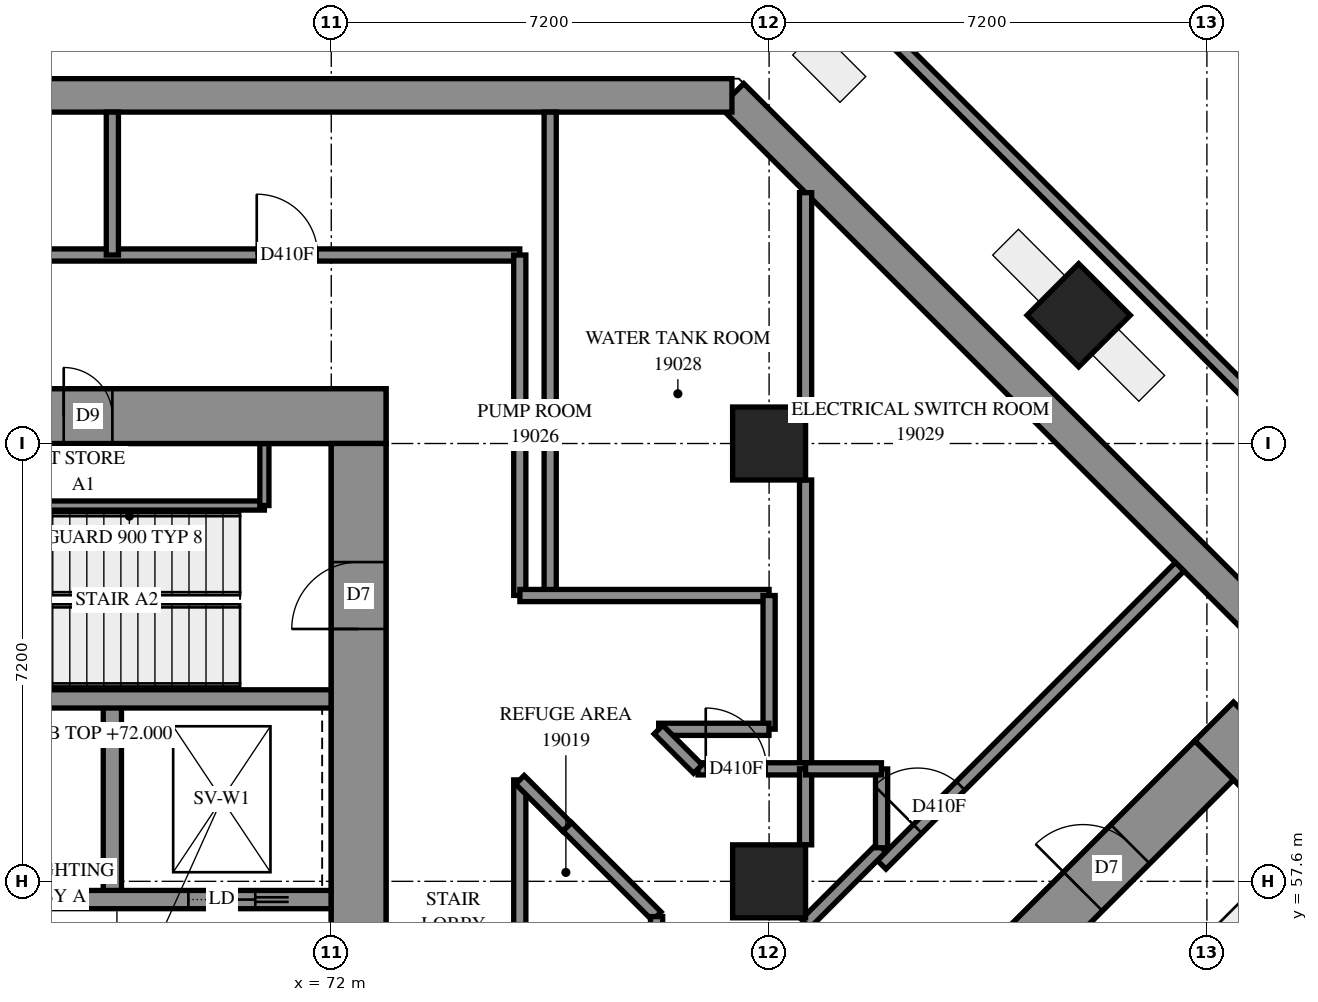
"""IFC4 building model, lengths in metres.
Left out: names, types, materials, properties, quantities, classifications, styles, units other than length and angle.
Written with IfcOpenShell. Run it as: python <this file> out.ifc"""

import sys

from ifc_helpers import new_model, si_unit, direction, frame, frame_2d, origin, origin_2d, place, context, subcontext, project, spatial, polyline, rectangle, outline, extrude, element, fill, save


model = new_model("IFC4")
c1 = context("Model", 3, precision=1e-05, world=origin(), true_north=direction((0.0, 1.0)))
c2 = subcontext(c1, "Body", "Model", "MODEL_VIEW")
j1 = project(units=[si_unit("LENGTHUNIT", "METRE"), si_unit("PLANEANGLEUNIT", "RADIAN")], contexts=[c1])
p1 = place(None, origin())
s1 = spatial("IfcSite", under=j1, at=p1, CompositionType="ELEMENT")
p2 = place(p1, origin())
s2 = spatial("IfcBuilding", under=s1, at=p2, CompositionType="ELEMENT")
p3 = place(p2, frame((0.0, 0.0, 72.0)))
s3 = spatial("IfcBuildingStorey", under=s2, at=p3, CompositionType="ELEMENT", Elevation=72.0)
for number, where, z_axis, x_axis in (
    (1, (79.2, 57.6, 0.0), (0.0, 0.0, 1.0), (1.0, 0.0, 0.0)),
    (2, (79.2, 64.8, 0.0), (0.0, 0.0, 1.0), (1.0, 0.0, 0.0)),
):
    element("IfcColumn", number, at=place(p3, frame(where, z_axis=z_axis, x_axis=x_axis)), inside=s3, PredefinedType="COLUMN", context=c2, shape_type="SweptSolid", body=[
        extrude(rectangle(XDim=1.2, YDim=1.2, at=origin_2d()), origin(), (0.0, 0.0, 1.0), 4.7),
    ])
p4 = place(p3, frame((84.291, 66.909, -0.3), z_axis=(0.0, 0.0, 1.0), x_axis=(0.7071067812, -0.7071067812, 0.0)))
e3 = element("IfcColumn", 3, at=p4, inside=s3, PredefinedType="COLUMN", context=c2, shape_type="SweptSolid", body=[
    extrude(rectangle(XDim=1.2, YDim=1.2, at=origin_2d()), origin(), (0.0, 0.0, 1.0), 5.0),
])
p5 = place(p3, frame((56.7, 65.25, -0.3), z_axis=(0.0, 0.0, 1.0), x_axis=(1.0, 0.0, 0.0)))
e4 = element("IfcWall", 4, at=p5, inside=s3, PredefinedType="SHEAR", context=c2, shape_type="SweptSolid", body=[
    extrude(rectangle(XDim=16.2, YDim=0.9, at=frame_2d((8.1, 0.0))), origin(), (0.0, 0.0, 1.0), 4.3),
])
p6 = place(p5, frame((10.9, 0.0, 0.3)))
e5 = element("IfcOpeningElement", 5, at=p6, cuts=e4, PredefinedType="OPENING", context=c2, shape_type="SweptSolid", body=[
    extrude(rectangle(XDim=0.8, YDim=2.1, at=frame_2d((0.4, 1.05))), frame((0.0, 0.46, 0.0), z_axis=(0.0, -1.0, 0.0), x_axis=(1.0, 0.0, 0.0)), (0.0, 0.0, 1.0), 0.92),
])
p7 = place(p3, frame((72.45, 50.4, -0.3), z_axis=(0.0, 0.0, 1.0), x_axis=(0.0, 1.0, 0.0)))
e6 = element("IfcWall", 6, at=p7, inside=s3, PredefinedType="SHEAR", context=c2, shape_type="SweptSolid", body=[
    extrude(rectangle(XDim=14.4, YDim=0.9, at=frame_2d((7.2, 0.0))), origin(), (0.0, 0.0, 1.0), 4.3),
])
p8 = place(p7, frame((4.55, 0.0, 0.3)))
e7 = element("IfcOpeningElement", 7, at=p8, cuts=e6, PredefinedType="OPENING", context=c2, shape_type="SweptSolid", body=[
    extrude(rectangle(XDim=1.1, YDim=2.1, at=frame_2d((0.55, 1.05))), frame((0.0, 0.46, 0.0), z_axis=(0.0, -1.0, 0.0), x_axis=(1.0, 0.0, 0.0)), (0.0, 0.0, 1.0), 0.92),
])
p9 = place(p7, frame((11.35, 0.0, 0.3)))
e8 = element("IfcOpeningElement", 8, at=p9, cuts=e6, PredefinedType="OPENING", context=c2, shape_type="SweptSolid", body=[
    extrude(rectangle(XDim=1.1, YDim=2.1, at=frame_2d((0.55, 1.05))), frame((0.0, 0.46, 0.0), z_axis=(0.0, -1.0, 0.0), x_axis=(1.0, 0.0, 0.0)), (0.0, 0.0, 1.0), 0.92),
])
p10 = place(p3, frame((68.4, 57.3, 0.0), z_axis=(0.0, 0.0, 1.0), x_axis=(0.0, 1.0, 0.0)))
e9 = element("IfcWall", 9, at=p10, inside=s3, PredefinedType="SOLIDWALL", context=c2, shape_type="SweptSolid", body=[
    extrude(rectangle(XDim=3.3, YDim=0.3, at=frame_2d((1.65, 0.0))), origin(), (0.0, 0.0, 1.0), 4.7),
])
p11 = place(p3, frame((57.6, 57.3, 0.0), z_axis=(0.0, 0.0, 1.0), x_axis=(1.0, 0.0, 0.0)))
e10 = element("IfcWall", 10, at=p11, inside=s3, PredefinedType="SOLIDWALL", context=c2, shape_type="SweptSolid", body=[
    extrude(rectangle(XDim=14.4, YDim=0.3, at=frame_2d((7.2, 0.0))), origin(), (0.0, 0.0, 1.0), 4.7),
])
p12 = place(p11, frame((12.05, 0.0, 0.0)))
e11 = element("IfcOpeningElement", 11, at=p12, cuts=e10, PredefinedType="OPENING", context=c2, shape_type="SweptSolid", body=[
    extrude(rectangle(XDim=1.1, YDim=2.1, at=frame_2d((0.55, 1.05))), frame((0.0, 0.16, 0.0), z_axis=(0.0, -1.0, 0.0), x_axis=(1.0, 0.0, 0.0)), (0.0, 0.0, 1.0), 0.32),
])
p13 = place(p3, frame((64.8, 60.6, 0.0), z_axis=(0.0, 0.0, 1.0), x_axis=(1.0, 0.0, 0.0)))
e12 = element("IfcWall", 12, at=p13, inside=s3, PredefinedType="SOLIDWALL", context=c2, shape_type="SweptSolid", body=[
    extrude(rectangle(XDim=7.2, YDim=0.3, at=frame_2d((3.6, 0.0))), origin(), (0.0, 0.0, 1.0), 4.7),
])
p14 = place(p3, frame((86.519, 60.227, -0.3), z_axis=(0.0, 0.0, 1.0), x_axis=(0.7071036948, -0.7071098676, 0.0)))
e13 = element("IfcWall", 13, at=p14, inside=s3, PredefinedType="SHEAR", context=c2, shape_type="SweptSolid", body=[
    extrude(rectangle(XDim=16.2, YDim=0.9, at=frame_2d((8.1, 0.0))), origin(), (0.0, 0.0, 1.0), 4.3),
])
p15 = place(p14, frame((10.9, 0.0, 0.3)))
e14 = element("IfcOpeningElement", 14, at=p15, cuts=e13, PredefinedType="OPENING", context=c2, shape_type="SweptSolid", body=[
    extrude(rectangle(XDim=0.8, YDim=2.1, at=frame_2d((0.4, 1.05))), frame((0.0, 0.46, 0.0), z_axis=(0.0, -1.0, 0.0), x_axis=(1.0, 0.0, 0.0)), (0.0, 0.0, 1.0), 0.92),
])
p16 = place(p3, frame((76.336, 49.408, -0.3), z_axis=(0.0, 0.0, 1.0), x_axis=(0.7071067812, 0.7071067812, 0.0)))
e15 = element("IfcWall", 15, at=p16, inside=s3, PredefinedType="SHEAR", context=c2, shape_type="SweptSolid", body=[
    extrude(rectangle(XDim=14.4, YDim=0.9, at=frame_2d((7.2, 0.0))), origin(), (0.0, 0.0, 1.0), 4.3),
])
p17 = place(p16, frame((4.55, 0.0, 0.3)))
e16 = element("IfcOpeningElement", 16, at=p17, cuts=e15, PredefinedType="OPENING", context=c2, shape_type="SweptSolid", body=[
    extrude(rectangle(XDim=1.1, YDim=2.1, at=frame_2d((0.55, 1.05))), frame((0.0, 0.46, 0.0), z_axis=(0.0, -1.0, 0.0), x_axis=(1.0, 0.0, 0.0)), (0.0, 0.0, 1.0), 0.92),
])
p18 = place(p16, frame((11.35, 0.0, 0.3)))
e17 = element("IfcOpeningElement", 17, at=p18, cuts=e15, PredefinedType="OPENING", context=c2, shape_type="SweptSolid", body=[
    extrude(rectangle(XDim=1.1, YDim=2.1, at=frame_2d((0.55, 1.05))), frame((0.0, 0.46, 0.0), z_axis=(0.0, -1.0, 0.0), x_axis=(1.0, 0.0, 0.0)), (0.0, 0.0, 1.0), 0.92),
])
p19 = place(p3, frame((111.055, 38.059, 0.0), z_axis=(0.0, 0.0, 1.0), x_axis=(-0.7071078702, 0.7071056922, 0.0)))
e18 = element("IfcWall", 18, at=p19, inside=s3, PredefinedType="SOLIDWALL", context=c2, shape_type="SweptSolid", body=[
    extrude(outline(polyline([(-0.275, -0.275), (46.028, -0.275), (45.8, 0.275), (0.275, 0.275), (-0.275, -0.275)])), origin(), (0.0, 0.0, 1.0), 4.7),
])
p20 = place(p3, frame((78.589, 70.525, 0.0), z_axis=(0.0, 0.0, 1.0), x_axis=(-1.0, 0.0, 0.0)))
e19 = element("IfcWall", 19, at=p20, inside=s3, PredefinedType="SOLIDWALL", context=c2, shape_type="SweptSolid", body=[
    extrude(outline(polyline([(-0.114, -0.275), (55.789, -0.275), (55.239, 0.275), (0.114, 0.275), (-0.114, -0.275)])), origin(), (0.0, 0.0, 1.0), 4.7),
])
p21 = place(p3, frame((112.929, 39.756, 0.0), z_axis=(0.0, 0.0, 1.0), x_axis=(-0.7071067812, 0.7071067812, 0.0)))
e20 = element("IfcWall", 20, at=p21, inside=s3, PredefinedType="SOLIDWALL", context=c2, shape_type="SweptSolid", body=[
    extrude(outline(polyline([(-0.1, -0.1), (47.126, -0.1), (47.044, 0.1), (0.1, 0.1), (-0.1, -0.1)])), origin(), (0.0, 0.0, 1.0), 4.7),
])
p22 = place(p3, frame((64.95, 63.78, 0.0), z_axis=(0.0, 0.0, 1.0), x_axis=(1.0, 0.0, 0.0)))
e21 = element("IfcWall", 21, at=p22, inside=s3, PredefinedType="PARTITIONING", context=c2, shape_type="SweptSolid", body=[
    extrude(rectangle(XDim=5.95, YDim=0.15, at=frame_2d((2.975, 0.0))), origin(), (0.0, 0.0, 1.0), 4.7),
])
p23 = place(p3, frame((70.9, 63.78, 0.0), z_axis=(0.0, 0.0, 1.0), x_axis=(0.0, 1.0, 0.0)))
e22 = element("IfcWall", 22, at=p23, inside=s3, PredefinedType="PARTITIONING", context=c2, shape_type="SweptSolid", body=[
    extrude(rectangle(XDim=1.02, YDim=0.15, at=frame_2d((0.51, 0.0))), origin(), (0.0, 0.0, 1.0), 4.7),
])
p24 = place(p3, frame((54.502, 67.9, 0.0), z_axis=(0.0, 0.0, 1.0), x_axis=(1.0, 0.0, 0.0)))
e23 = element("IfcWall", 23, at=p24, inside=s3, PredefinedType="PARTITIONING", context=c2, shape_type="SweptSolid", body=[
    extrude(rectangle(XDim=20.598, YDim=0.2, at=frame_2d((10.299, 0.0))), origin(), (0.0, 0.0, 1.0), 4.7),
])
p25 = place(p24, frame((1.871, 0.0, 0.0)))
e24 = element("IfcOpeningElement", 24, at=p25, cuts=e23, PredefinedType="OPENING", context=c2, shape_type="SweptSolid", body=[
    extrude(rectangle(XDim=1.0, YDim=2.1, at=frame_2d((0.5, 1.05))), frame((0.0, 0.11, 0.0), z_axis=(0.0, -1.0, 0.0), x_axis=(1.0, 0.0, 0.0)), (0.0, 0.0, 1.0), 0.22),
])
p26 = place(p24, frame((16.273, 0.0, 0.0)))
e25 = element("IfcOpeningElement", 25, at=p26, cuts=e23, PredefinedType="OPENING", context=c2, shape_type="SweptSolid", body=[
    extrude(rectangle(XDim=1.0, YDim=2.1, at=frame_2d((0.5, 1.05))), frame((0.0, 0.11, 0.0), z_axis=(0.0, -1.0, 0.0), x_axis=(1.0, 0.0, 0.0)), (0.0, 0.0, 1.0), 0.22),
])
p27 = place(p24, frame((9.036, 0.0, 0.0)))
e26 = element("IfcOpeningElement", 26, at=p27, cuts=e23, PredefinedType="OPENING", context=c2, shape_type="SweptSolid", body=[
    extrude(rectangle(XDim=1.0, YDim=2.1, at=frame_2d((0.5, 1.05))), frame((0.0, 0.11, 0.0), z_axis=(0.0, -1.0, 0.0), x_axis=(1.0, 0.0, 0.0)), (0.0, 0.0, 1.0), 0.22),
])
p28 = place(p3, frame((75.6, 62.3, 0.0), z_axis=(0.0, 0.0, 1.0), x_axis=(0.0, 1.0, 0.0)))
e27 = element("IfcWall", 27, at=p28, inside=s3, PredefinedType="PARTITIONING", context=c2, shape_type="SweptSolid", body=[
    extrude(rectangle(XDim=7.95, YDim=0.2, at=frame_2d((3.975, 0.0))), origin(), (0.0, 0.0, 1.0), 4.7),
])
p29 = place(p3, frame((81.052, 57.873, 0.0), z_axis=(0.0, 0.0, 1.0), x_axis=(0.7070995666, 0.7071139957, 0.0)))
e28 = element("IfcWall", 28, at=p29, inside=s3, PredefinedType="PARTITIONING", context=c2, shape_type="SweptSolid", body=[
    extrude(rectangle(XDim=6.93, YDim=0.2, at=frame_2d((3.465, 0.0))), origin(), (0.0, 0.0, 1.0), 4.7),
])
p30 = place(p29, frame((0.835, 0.0, 0.0)))
e29 = element("IfcOpeningElement", 29, at=p30, cuts=e28, PredefinedType="OPENING", context=c2, shape_type="SweptSolid", body=[
    extrude(rectangle(XDim=1.0, YDim=2.1, at=frame_2d((0.5, 1.05))), frame((0.0, 0.11, 0.0), z_axis=(0.0, -1.0, 0.0), x_axis=(1.0, 0.0, 0.0)), (0.0, 0.0, 1.0), 0.22),
])
p31 = place(p3, frame((75.1, 62.302, 0.0), z_axis=(0.0, 0.0, 1.0), x_axis=(0.0, 1.0, 0.0)))
e30 = element("IfcWall", 30, at=p31, inside=s3, PredefinedType="PARTITIONING", context=c2, shape_type="SweptSolid", body=[
    extrude(rectangle(XDim=5.598, YDim=0.2, at=frame_2d((2.799, 0.0))), origin(), (0.0, 0.0, 1.0), 4.7),
])
p32 = place(p3, frame((79.8, 59.45, 0.0), z_axis=(0.0, 0.0, 1.0), x_axis=(0.0, 1.0, 0.0)))
e31 = element("IfcWall", 31, at=p32, inside=s3, PredefinedType="PARTITIONING", context=c2, shape_type="SweptSolid", body=[
    extrude(rectangle(XDim=4.75, YDim=0.2, at=frame_2d((2.375, 0.0))), origin(), (0.0, 0.0, 1.0), 4.7),
])
p33 = place(p3, frame((75.1, 55.102, 0.0), z_axis=(0.0, 0.0, 1.0), x_axis=(0.0, 1.0, 0.0)))
e32 = element("IfcWall", 32, at=p33, inside=s3, PredefinedType="PARTITIONING", context=c2, shape_type="SweptSolid", body=[
    extrude(rectangle(XDim=4.166, YDim=0.2, at=frame_2d((2.083, 0.0))), origin(), (0.0, 0.0, 1.0), 4.7),
])
p34 = place(p3, frame((75.102, 62.3, 0.0), z_axis=(0.0, 0.0, 1.0), x_axis=(1.0, 0.0, 0.0)))
e33 = element("IfcWall", 33, at=p34, inside=s3, PredefinedType="PARTITIONING", context=c2, shape_type="SweptSolid", body=[
    extrude(rectangle(XDim=4.098, YDim=0.2, at=frame_2d((2.049, 0.0))), origin(), (0.0, 0.0, 1.0), 4.7),
])
p35 = place(p3, frame((79.8, 65.4, 0.0), z_axis=(0.0, 0.0, 1.0), x_axis=(0.0, 1.0, 0.0)))
e34 = element("IfcWall", 34, at=p35, inside=s3, PredefinedType="PARTITIONING", context=c2, shape_type="SweptSolid", body=[
    extrude(rectangle(XDim=3.525, YDim=0.2, at=frame_2d((1.763, 0.0))), origin(), (0.0, 0.0, 1.0), 4.7),
])
p36 = place(p3, frame((68.4, 67.9, 0.0), z_axis=(0.0, 0.0, 1.0), x_axis=(0.0, 1.0, 0.0)))
e35 = element("IfcWall", 35, at=p36, inside=s3, PredefinedType="PARTITIONING", context=c2, shape_type="SweptSolid", body=[
    extrude(rectangle(XDim=2.35, YDim=0.2, at=frame_2d((1.175, 0.0))), origin(), (0.0, 0.0, 1.0), 4.7),
])
p37 = place(p3, frame((79.2, 60.102, 0.0), z_axis=(0.0, 0.0, 1.0), x_axis=(0.0, 1.0, 0.0)))
e36 = element("IfcWall", 36, at=p37, inside=s3, PredefinedType="PARTITIONING", context=c2, shape_type="SweptSolid", body=[
    extrude(rectangle(XDim=2.198, YDim=0.2, at=frame_2d((1.099, 0.0))), origin(), (0.0, 0.0, 1.0), 4.7),
])
p38 = place(p3, frame((75.879, 58.497, 0.0), z_axis=(0.0, 0.0, 1.0), x_axis=(0.7075866635, -0.706626573, 0.0)))
e37 = element("IfcWall", 37, at=p38, inside=s3, PredefinedType="PARTITIONING", context=c2, shape_type="SweptSolid", body=[
    extrude(rectangle(XDim=2.083, YDim=0.2, at=frame_2d((1.042, 0.0))), origin(), (0.0, 0.0, 1.0), 4.7),
])
p39 = place(p3, frame((77.384, 60.1, 0.0), z_axis=(0.0, 0.0, 1.0), x_axis=(1.0, 0.0, 0.0)))
e38 = element("IfcWall", 38, at=p39, inside=s3, PredefinedType="PARTITIONING", context=c2, shape_type="SweptSolid", body=[
    extrude(rectangle(XDim=1.814, YDim=0.2, at=frame_2d((0.907, 0.0))), origin(), (0.0, 0.0, 1.0), 4.7),
])
p40 = place(p3, frame((78.032, 59.45, 0.0), z_axis=(0.0, 0.0, 1.0), x_axis=(1.0, 0.0, 0.0)))
e39 = element("IfcWall", 39, at=p40, inside=s3, PredefinedType="PARTITIONING", context=c2, shape_type="SweptSolid", body=[
    extrude(rectangle(XDim=1.768, YDim=0.2, at=frame_2d((0.884, 0.0))), origin(), (0.0, 0.0, 1.0), 4.7),
])
p41 = place(p40, frame((0.126, 0.0, 0.0)))
e40 = element("IfcOpeningElement", 40, at=p41, cuts=e39, PredefinedType="OPENING", context=c2, shape_type="SweptSolid", body=[
    extrude(rectangle(XDim=1.0, YDim=2.1, at=frame_2d((0.5, 1.05))), frame((0.0, 0.11, 0.0), z_axis=(0.0, -1.0, 0.0), x_axis=(1.0, 0.0, 0.0)), (0.0, 0.0, 1.0), 0.22),
])
p42 = place(p3, frame((79.801, 56.905, 0.0), z_axis=(0.0, 0.0, 1.0), x_axis=(0.7071067812, 0.7071067812, 0.0)))
e41 = element("IfcWall", 41, at=p42, inside=s3, PredefinedType="PARTITIONING", context=c2, shape_type="SweptSolid", body=[
    extrude(rectangle(XDim=1.765, YDim=0.2, at=frame_2d((0.882, 0.0))), origin(), (0.0, 0.0, 1.0), 4.7),
])
p43 = place(p3, frame((81.05, 58.152, 0.0), z_axis=(0.0, 0.0, 1.0), x_axis=(0.0, 1.0, 0.0)))
e42 = element("IfcWall", 42, at=p43, inside=s3, PredefinedType="PARTITIONING", context=c2, shape_type="SweptSolid", body=[
    extrude(rectangle(XDim=1.296, YDim=0.2, at=frame_2d((0.648, 0.0))), origin(), (0.0, 0.0, 1.0), 4.7),
])
p44 = place(p3, frame((77.35, 55.75, 0.0), z_axis=(0.0, 0.0, 1.0), x_axis=(0.0, 1.0, 0.0)))
e43 = element("IfcWall", 43, at=p44, inside=s3, PredefinedType="PARTITIONING", context=c2, shape_type="SweptSolid", body=[
    extrude(rectangle(XDim=1.27, YDim=0.2, at=frame_2d((0.635, 0.0))), origin(), (0.0, 0.0, 1.0), 4.7),
])
p45 = place(p3, frame((79.8, 58.2, 0.0), z_axis=(0.0, 0.0, 1.0), x_axis=(0.0, 1.0, 0.0)))
e44 = element("IfcWall", 44, at=p45, inside=s3, PredefinedType="PARTITIONING", context=c2, shape_type="SweptSolid", body=[
    extrude(rectangle(XDim=1.25, YDim=0.2, at=frame_2d((0.625, 0.0))), origin(), (0.0, 0.0, 1.0), 4.7),
])
p46 = place(p3, frame((79.8, 59.45, 0.0), z_axis=(0.0, 0.0, 1.0), x_axis=(1.0, 0.0, 0.0)))
e45 = element("IfcWall", 45, at=p46, inside=s3, PredefinedType="PARTITIONING", context=c2, shape_type="SweptSolid", body=[
    extrude(rectangle(XDim=1.248, YDim=0.2, at=frame_2d((0.624, 0.0))), origin(), (0.0, 0.0, 1.0), 4.7),
])
p47 = place(p3, frame((75.102, 59.27, 0.0), z_axis=(0.0, 0.0, 1.0), x_axis=(0.7061937975, -0.7080185876, 0.0)))
e46 = element("IfcWall", 46, at=p47, inside=s3, PredefinedType="PARTITIONING", context=c2, shape_type="SweptSolid", body=[
    extrude(rectangle(XDim=1.096, YDim=0.2, at=frame_2d((0.548, 0.0))), origin(), (0.0, 0.0, 1.0), 4.7),
])
p48 = place(p3, frame((77.381, 60.095, 0.0), z_axis=(0.0, 0.0, 1.0), x_axis=(0.7071067812, -0.7071067812, 0.0)))
e47 = element("IfcWall", 47, at=p48, inside=s3, PredefinedType="PARTITIONING", context=c2, shape_type="SweptSolid", body=[
    extrude(rectangle(XDim=0.916, YDim=0.2, at=frame_2d((0.458, 0.0))), origin(), (0.0, 0.0, 1.0), 4.7),
])
p49 = place(p6, origin())
e48 = element("IfcDoor", 48, at=p49, inside=s3, OperationType="SINGLE_SWING_RIGHT", PredefinedType="DOOR", context=c2, shape_type="SweptSolid", body=[
    extrude(rectangle(XDim=0.8, YDim=2.1, at=frame_2d((0.4, 1.05))), frame((0.0, -0.39, 0.0), z_axis=(0.0, -1.0, 0.0), x_axis=(1.0, 0.0, 0.0)), (0.0, 0.0, 1.0), 0.05),
])
fill(e5, e48)
p50 = place(p9, origin())
e49 = element("IfcDoor", 49, at=p50, inside=s3, OperationType="SINGLE_SWING_RIGHT", PredefinedType="DOOR", context=c2, shape_type="SweptSolid", body=[
    extrude(rectangle(XDim=1.1, YDim=2.1, at=frame_2d((0.55, 1.05))), frame((0.0, 0.025, 0.0), z_axis=(0.0, -1.0, 0.0), x_axis=(1.0, 0.0, 0.0)), (0.0, 0.0, 1.0), 0.05),
])
fill(e8, e49)
p51 = place(p12, origin())
e50 = element("IfcDoor", 50, at=p51, inside=s3, OperationType="SLIDING_TO_RIGHT", PredefinedType="DOOR", context=c2, shape_type="SweptSolid", body=[
    extrude(rectangle(XDim=1.1, YDim=2.1, at=frame_2d((0.55, 1.05))), frame((0.0, 0.025, 0.0), z_axis=(0.0, -1.0, 0.0), x_axis=(1.0, 0.0, 0.0)), (0.0, 0.0, 1.0), 0.05),
])
fill(e11, e50)
p52 = place(p18, origin())
e51 = element("IfcDoor", 51, at=p52, inside=s3, OperationType="SINGLE_SWING_LEFT", PredefinedType="DOOR", context=c2, shape_type="SweptSolid", body=[
    extrude(rectangle(XDim=1.1, YDim=2.1, at=frame_2d((0.55, 1.05))), frame((0.0, 0.025, 0.0), z_axis=(0.0, -1.0, 0.0), x_axis=(1.0, 0.0, 0.0)), (0.0, 0.0, 1.0), 0.05),
])
fill(e17, e51)
p53 = place(p26, origin())
e52 = element("IfcDoor", 52, at=p53, inside=s3, OperationType="SINGLE_SWING_LEFT", PredefinedType="DOOR", context=c2, shape_type="SweptSolid", body=[
    extrude(rectangle(XDim=1.0, YDim=2.1, at=frame_2d((0.5, 1.05))), frame((0.0, 0.025, 0.0), z_axis=(0.0, -1.0, 0.0), x_axis=(1.0, 0.0, 0.0)), (0.0, 0.0, 1.0), 0.05),
])
fill(e25, e52)
p54 = place(p41, origin())
e53 = element("IfcDoor", 53, at=p54, inside=s3, OperationType="SINGLE_SWING_LEFT", PredefinedType="DOOR", context=c2, shape_type="SweptSolid", body=[
    extrude(rectangle(XDim=1.0, YDim=2.1, at=frame_2d((0.5, 1.05))), frame((0.0, 0.025, 0.0), z_axis=(0.0, -1.0, 0.0), x_axis=(1.0, 0.0, 0.0)), (0.0, 0.0, 1.0), 0.05),
])
fill(e40, e53)
p55 = place(p30, origin())
e54 = element("IfcDoor", 54, at=p55, inside=s3, OperationType="SINGLE_SWING_RIGHT", PredefinedType="DOOR", context=c2, shape_type="SweptSolid", body=[
    extrude(rectangle(XDim=1.0, YDim=2.1, at=frame_2d((0.5, 1.05))), frame((0.0, 0.025, 0.0), z_axis=(0.0, -1.0, 0.0), x_axis=(1.0, 0.0, 0.0)), (0.0, 0.0, 1.0), 0.05),
])
fill(e29, e54)
save(model, sys.argv[1])
